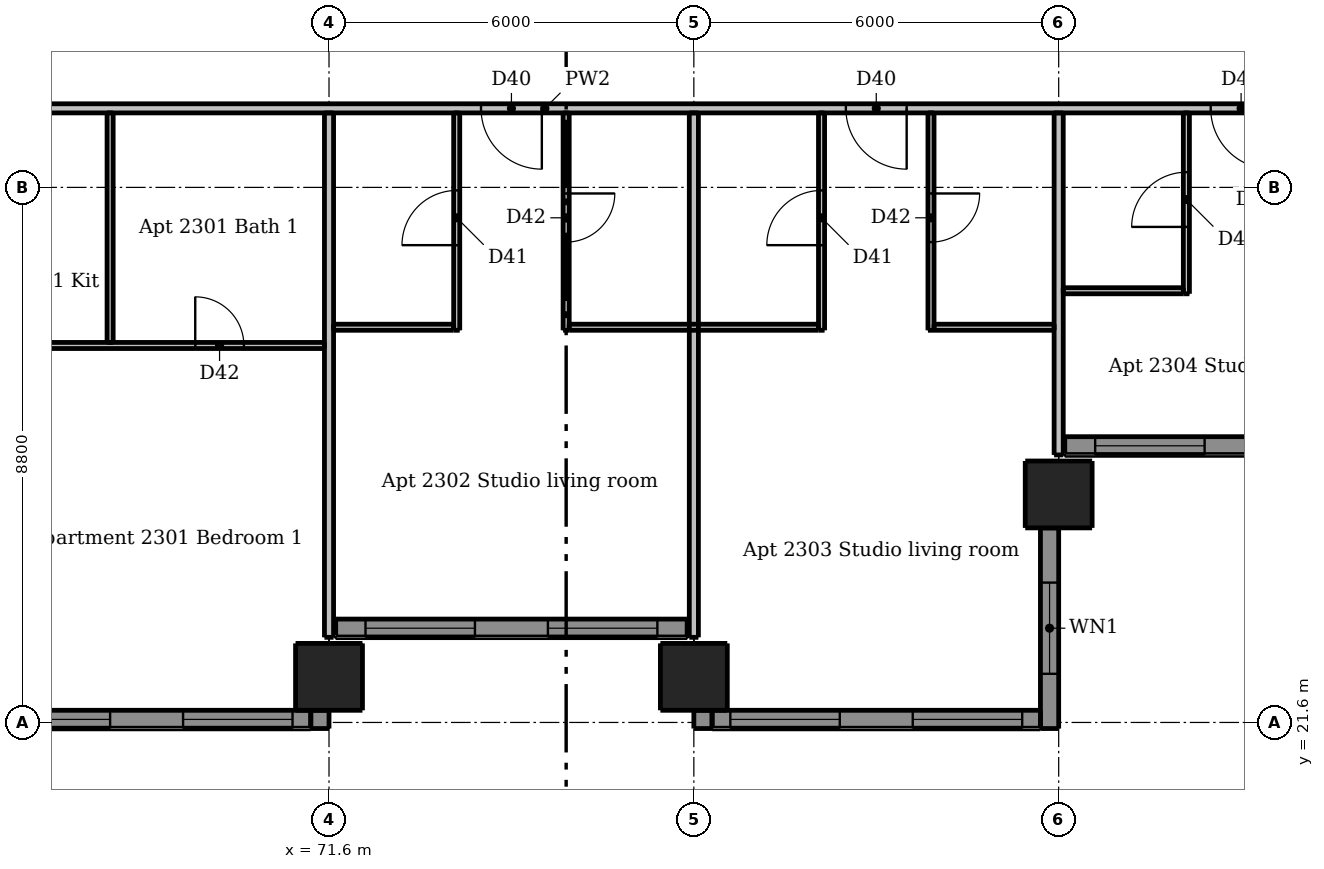
"""IFC4 building model, lengths in metres.
Left out: names, types, materials, properties, quantities, classifications, styles, units other than length and angle.
Written with IfcOpenShell. Run it as: python <this file> out.ifc"""

import sys

from ifc_helpers import new_model, si_unit, direction, frame, frame_2d, origin, origin_2d, place, context, subcontext, project, spatial, rectangle, extrude, element, fill, save


model = new_model("IFC4")
c1 = context("Model", 3, precision=1e-05, world=origin(), true_north=direction((0.0, 1.0)))
c2 = subcontext(c1, "Body", "Model", "MODEL_VIEW")
j1 = project(units=[si_unit("LENGTHUNIT", "METRE"), si_unit("PLANEANGLEUNIT", "RADIAN")], contexts=[c1])
p1 = place(None, origin())
s1 = spatial("IfcSite", under=j1, at=p1, CompositionType="ELEMENT")
p2 = place(p1, origin())
s2 = spatial("IfcBuilding", under=s1, at=p2, CompositionType="ELEMENT")
p3 = place(p2, frame((0.0, 0.0, 88.6)))
s3 = spatial("IfcBuildingStorey", under=s2, at=p3, CompositionType="ELEMENT", Elevation=88.6)
for number, where, z_axis, x_axis in (
    (1, (71.6, 22.35, 0.0), (0.0, 0.0, 1.0), (1.0, 0.0, 0.0)),
    (2, (77.6, 22.35, 0.0), (0.0, 0.0, 1.0), (1.0, 0.0, 0.0)),
    (3, (83.6, 25.35, 0.0), (0.0, 0.0, 1.0), (1.0, 0.0, 0.0)),
):
    element("IfcColumn", number, at=place(p3, frame(where, z_axis=z_axis, x_axis=x_axis)), inside=s3, PredefinedType="COLUMN", context=c2, shape_type="SweptSolid", body=[
        extrude(rectangle(XDim=1.1, YDim=1.1, at=origin_2d()), origin(), (0.0, 0.0, 1.0), 3.05),
    ])
for number, where, z_axis, x_axis in (
    (4, (71.45, 21.5, 0.0), (0.0, 0.0, 1.0), (0.0, 1.0, 0.0)),
    (5, (77.75, 21.8, 0.0), (0.0, 0.0, 1.0), (0.0, -1.0, 0.0)),
):
    element("IfcWall", number, at=place(p3, frame(where, z_axis=z_axis, x_axis=x_axis)), inside=s3, PredefinedType="SOLIDWALL", context=c2, shape_type="SweptSolid", body=[
        extrude(rectangle(XDim=0.3, YDim=0.3, at=frame_2d((0.15, 0.0))), origin(), (0.0, 0.0, 1.0), 3.05),
    ])
p4 = place(p3, frame((83.45, 21.5, 0.0), z_axis=(0.0, 0.0, 1.0), x_axis=(0.0, 1.0, 0.0)))
e6 = element("IfcWall", 6, at=p4, inside=s3, PredefinedType="SOLIDWALL", context=c2, shape_type="SweptSolid", body=[
    extrude(rectangle(XDim=3.3, YDim=0.3, at=frame_2d((1.65, 0.0))), origin(), (0.0, 0.0, 1.0), 3.05),
])
p5 = place(p4, frame((0.9, 0.0, 0.9)))
e7 = element("IfcOpeningElement", 7, at=p5, cuts=e6, PredefinedType="OPENING", context=c2, shape_type="SweptSolid", body=[
    extrude(rectangle(XDim=1.5, YDim=1.5, at=frame_2d((0.75, 0.75))), frame((0.0, 0.16, 0.0), z_axis=(0.0, -1.0, 0.0), x_axis=(1.0, 0.0, 0.0)), (0.0, 0.0, 1.0), 0.32),
])
p6 = place(p3, frame((65.6, 21.65, 0.0), z_axis=(0.0, 0.0, 1.0), x_axis=(1.0, 0.0, 0.0)))
e8 = element("IfcWall", 8, at=p6, inside=s3, PredefinedType="SOLIDWALL", context=c2, shape_type="SweptSolid", body=[
    extrude(rectangle(XDim=5.7, YDim=0.3, at=frame_2d((2.85, 0.0))), origin(), (0.0, 0.0, 1.0), 3.05),
])
p7 = place(p6, frame((0.6, 0.0, 0.15)))
e9 = element("IfcOpeningElement", 9, at=p7, cuts=e8, PredefinedType="OPENING", context=c2, shape_type="SweptSolid", body=[
    extrude(rectangle(XDim=1.8, YDim=2.1, at=frame_2d((0.9, 1.05))), frame((0.0, 0.16, 0.0), z_axis=(0.0, -1.0, 0.0), x_axis=(1.0, 0.0, 0.0)), (0.0, 0.0, 1.0), 0.32),
])
p8 = place(p6, frame((3.6, 0.0, 0.15)))
e10 = element("IfcOpeningElement", 10, at=p8, cuts=e8, PredefinedType="OPENING", context=c2, shape_type="SweptSolid", body=[
    extrude(rectangle(XDim=1.8, YDim=2.1, at=frame_2d((0.9, 1.05))), frame((0.0, 0.16, 0.0), z_axis=(0.0, -1.0, 0.0), x_axis=(1.0, 0.0, 0.0)), (0.0, 0.0, 1.0), 0.32),
])
p9 = place(p3, frame((71.71, 23.15, 0.0), z_axis=(0.0, 0.0, 1.0), x_axis=(1.0, 0.0, 0.0)))
e11 = element("IfcWall", 11, at=p9, inside=s3, PredefinedType="SOLIDWALL", context=c2, shape_type="SweptSolid", body=[
    extrude(rectangle(XDim=5.78, YDim=0.3, at=frame_2d((2.89, 0.0))), origin(), (0.0, 0.0, 1.0), 3.05),
])
p10 = place(p9, frame((0.49, 0.0, 0.15)))
e12 = element("IfcOpeningElement", 12, at=p10, cuts=e11, PredefinedType="OPENING", context=c2, shape_type="SweptSolid", body=[
    extrude(rectangle(XDim=1.8, YDim=2.1, at=frame_2d((0.9, 1.05))), frame((0.0, 0.16, 0.0), z_axis=(0.0, -1.0, 0.0), x_axis=(1.0, 0.0, 0.0)), (0.0, 0.0, 1.0), 0.32),
])
p11 = place(p9, frame((3.49, 0.0, 0.15)))
e13 = element("IfcOpeningElement", 13, at=p11, cuts=e11, PredefinedType="OPENING", context=c2, shape_type="SweptSolid", body=[
    extrude(rectangle(XDim=1.8, YDim=2.1, at=frame_2d((0.9, 1.05))), frame((0.0, 0.16, 0.0), z_axis=(0.0, -1.0, 0.0), x_axis=(1.0, 0.0, 0.0)), (0.0, 0.0, 1.0), 0.32),
])
p12 = place(p3, frame((77.9, 21.65, 0.0), z_axis=(0.0, 0.0, 1.0), x_axis=(1.0, 0.0, 0.0)))
e14 = element("IfcWall", 14, at=p12, inside=s3, PredefinedType="SOLIDWALL", context=c2, shape_type="SweptSolid", body=[
    extrude(rectangle(XDim=5.4, YDim=0.3, at=frame_2d((2.7, 0.0))), origin(), (0.0, 0.0, 1.0), 3.05),
])
p13 = place(p12, frame((0.3, 0.0, 0.15)))
e15 = element("IfcOpeningElement", 15, at=p13, cuts=e14, PredefinedType="OPENING", context=c2, shape_type="SweptSolid", body=[
    extrude(rectangle(XDim=1.8, YDim=2.1, at=frame_2d((0.9, 1.05))), frame((0.0, 0.16, 0.0), z_axis=(0.0, -1.0, 0.0), x_axis=(1.0, 0.0, 0.0)), (0.0, 0.0, 1.0), 0.32),
])
p14 = place(p12, frame((3.3, 0.0, 0.15)))
e16 = element("IfcOpeningElement", 16, at=p14, cuts=e14, PredefinedType="OPENING", context=c2, shape_type="SweptSolid", body=[
    extrude(rectangle(XDim=1.8, YDim=2.1, at=frame_2d((0.9, 1.05))), frame((0.0, 0.16, 0.0), z_axis=(0.0, -1.0, 0.0), x_axis=(1.0, 0.0, 0.0)), (0.0, 0.0, 1.0), 0.32),
])
p15 = place(p3, frame((83.7, 26.15, 0.0), z_axis=(0.0, 0.0, 1.0), x_axis=(1.0, 0.0, 0.0)))
e17 = element("IfcWall", 17, at=p15, inside=s3, PredefinedType="SOLIDWALL", context=c2, shape_type="SweptSolid", body=[
    extrude(rectangle(XDim=5.79, YDim=0.3, at=frame_2d((2.895, 0.0))), origin(), (0.0, 0.0, 1.0), 3.05),
])
p16 = place(p15, frame((0.5, 0.0, 0.15)))
e18 = element("IfcOpeningElement", 18, at=p16, cuts=e17, PredefinedType="OPENING", context=c2, shape_type="SweptSolid", body=[
    extrude(rectangle(XDim=1.8, YDim=2.1, at=frame_2d((0.9, 1.05))), frame((0.0, 0.16, 0.0), z_axis=(0.0, -1.0, 0.0), x_axis=(1.0, 0.0, 0.0)), (0.0, 0.0, 1.0), 0.32),
])
p17 = place(p15, frame((3.5, 0.0, 0.15)))
e19 = element("IfcOpeningElement", 19, at=p17, cuts=e17, PredefinedType="OPENING", context=c2, shape_type="SweptSolid", body=[
    extrude(rectangle(XDim=1.8, YDim=2.1, at=frame_2d((0.9, 1.05))), frame((0.0, 0.16, 0.0), z_axis=(0.0, -1.0, 0.0), x_axis=(1.0, 0.0, 0.0)), (0.0, 0.0, 1.0), 0.32),
])
p18 = place(p3, frame((68.0, 27.85, 0.0), z_axis=(0.0, 0.0, 1.0), x_axis=(0.0, 1.0, 0.0)))
e20 = element("IfcWall", 20, at=p18, inside=s3, PredefinedType="PARTITIONING", context=c2, shape_type="SweptSolid", body=[
    extrude(rectangle(XDim=3.775, YDim=0.1, at=frame_2d((1.887, 0.0))), origin(), (0.0, 0.0, 1.0), 3.05),
])
p19 = place(p3, frame((73.7, 28.05, 0.0), z_axis=(0.0, 0.0, 1.0), x_axis=(0.0, 1.0, 0.0)))
e21 = element("IfcWall", 21, at=p19, inside=s3, PredefinedType="PARTITIONING", context=c2, shape_type="SweptSolid", body=[
    extrude(rectangle(XDim=3.575, YDim=0.1, at=frame_2d((1.788, 0.0))), origin(), (0.0, 0.0, 1.0), 3.05),
])
p20 = place(p19, frame((1.4, 0.0, 0.0)))
e22 = element("IfcOpeningElement", 22, at=p20, cuts=e21, PredefinedType="OPENING", context=c2, shape_type="SweptSolid", body=[
    extrude(rectangle(XDim=0.9, YDim=2.1, at=frame_2d((0.45, 1.05))), frame((0.0, 0.06, 0.0), z_axis=(0.0, -1.0, 0.0), x_axis=(1.0, 0.0, 0.0)), (0.0, 0.0, 1.0), 0.12),
])
p21 = place(p3, frame((75.5, 31.625, 0.0), z_axis=(0.0, 0.0, 1.0), x_axis=(0.0, -1.0, 0.0)))
e23 = element("IfcWall", 23, at=p21, inside=s3, PredefinedType="PARTITIONING", context=c2, shape_type="SweptSolid", body=[
    extrude(rectangle(XDim=3.575, YDim=0.1, at=frame_2d((1.788, 0.0))), origin(), (0.0, 0.0, 1.0), 3.05),
])
p22 = place(p21, frame((1.325, 0.0, 0.0)))
e24 = element("IfcOpeningElement", 24, at=p22, cuts=e23, PredefinedType="OPENING", context=c2, shape_type="SweptSolid", body=[
    extrude(rectangle(XDim=0.8, YDim=2.1, at=frame_2d((0.4, 1.05))), frame((0.0, 0.06, 0.0), z_axis=(0.0, -1.0, 0.0), x_axis=(1.0, 0.0, 0.0)), (0.0, 0.0, 1.0), 0.12),
])
p23 = place(p3, frame((79.7, 28.05, 0.0), z_axis=(0.0, 0.0, 1.0), x_axis=(0.0, 1.0, 0.0)))
e25 = element("IfcWall", 25, at=p23, inside=s3, PredefinedType="PARTITIONING", context=c2, shape_type="SweptSolid", body=[
    extrude(rectangle(XDim=3.575, YDim=0.1, at=frame_2d((1.788, 0.0))), origin(), (0.0, 0.0, 1.0), 3.05),
])
p24 = place(p23, frame((1.4, 0.0, 0.0)))
e26 = element("IfcOpeningElement", 26, at=p24, cuts=e25, PredefinedType="OPENING", context=c2, shape_type="SweptSolid", body=[
    extrude(rectangle(XDim=0.9, YDim=2.1, at=frame_2d((0.45, 1.05))), frame((0.0, 0.06, 0.0), z_axis=(0.0, -1.0, 0.0), x_axis=(1.0, 0.0, 0.0)), (0.0, 0.0, 1.0), 0.12),
])
p25 = place(p3, frame((81.5, 31.625, 0.0), z_axis=(0.0, 0.0, 1.0), x_axis=(0.0, -1.0, 0.0)))
e27 = element("IfcWall", 27, at=p25, inside=s3, PredefinedType="PARTITIONING", context=c2, shape_type="SweptSolid", body=[
    extrude(rectangle(XDim=3.575, YDim=0.1, at=frame_2d((1.788, 0.0))), origin(), (0.0, 0.0, 1.0), 3.05),
])
p26 = place(p25, frame((1.325, 0.0, 0.0)))
e28 = element("IfcOpeningElement", 28, at=p26, cuts=e27, PredefinedType="OPENING", context=c2, shape_type="SweptSolid", body=[
    extrude(rectangle(XDim=0.8, YDim=2.1, at=frame_2d((0.4, 1.05))), frame((0.0, 0.06, 0.0), z_axis=(0.0, -1.0, 0.0), x_axis=(1.0, 0.0, 0.0)), (0.0, 0.0, 1.0), 0.12),
])
p27 = place(p3, frame((85.7, 28.65, 0.0), z_axis=(0.0, 0.0, 1.0), x_axis=(0.0, 1.0, 0.0)))
e29 = element("IfcWall", 29, at=p27, inside=s3, PredefinedType="PARTITIONING", context=c2, shape_type="SweptSolid", body=[
    extrude(rectangle(XDim=2.975, YDim=0.1, at=frame_2d((1.488, 0.0))), origin(), (0.0, 0.0, 1.0), 3.05),
])
p28 = place(p27, frame((1.1, 0.0, 0.0)))
e30 = element("IfcOpeningElement", 30, at=p28, cuts=e29, PredefinedType="OPENING", context=c2, shape_type="SweptSolid", body=[
    extrude(rectangle(XDim=0.9, YDim=2.1, at=frame_2d((0.45, 1.05))), frame((0.0, 0.06, 0.0), z_axis=(0.0, -1.0, 0.0), x_axis=(1.0, 0.0, 0.0)), (0.0, 0.0, 1.0), 0.12),
])
for number, where, z_axis, x_axis in (
    (31, (83.675, 28.7, 0.0), (0.0, 0.0, 1.0), (1.0, 0.0, 0.0)),
    (32, (71.675, 28.1, 0.0), (0.0, 0.0, 1.0), (1.0, 0.0, 0.0)),
):
    element("IfcWall", number, at=place(p3, frame(where, z_axis=z_axis, x_axis=x_axis)), inside=s3, PredefinedType="PARTITIONING", context=c2, shape_type="SweptSolid", body=[
        extrude(rectangle(XDim=1.975, YDim=0.1, at=frame_2d((0.987, 0.0))), origin(), (0.0, 0.0, 1.0), 3.05),
    ])
p29 = place(p3, frame((75.55, 28.1, 0.0), z_axis=(0.0, 0.0, 1.0), x_axis=(1.0, 0.0, 0.0)))
e33 = element("IfcWall", 33, at=p29, inside=s3, PredefinedType="PARTITIONING", context=c2, shape_type="SweptSolid", body=[
    extrude(rectangle(XDim=4.1, YDim=0.1, at=frame_2d((2.05, 0.0))), origin(), (0.0, 0.0, 1.0), 3.05),
])
p30 = place(p3, frame((81.55, 28.1, 0.0), z_axis=(0.0, 0.0, 1.0), x_axis=(1.0, 0.0, 0.0)))
e34 = element("IfcWall", 34, at=p30, inside=s3, PredefinedType="PARTITIONING", context=c2, shape_type="SweptSolid", body=[
    extrude(rectangle(XDim=1.975, YDim=0.1, at=frame_2d((0.987, 0.0))), origin(), (0.0, 0.0, 1.0), 3.05),
])
p31 = place(p3, frame((65.65, 27.8, 0.0), z_axis=(0.0, 0.0, 1.0), x_axis=(1.0, 0.0, 0.0)))
e35 = element("IfcWall", 35, at=p31, inside=s3, PredefinedType="PARTITIONING", context=c2, shape_type="SweptSolid", body=[
    extrude(rectangle(XDim=5.875, YDim=0.1, at=frame_2d((2.938, 0.0))), origin(), (0.0, 0.0, 1.0), 3.05),
])
p32 = place(p31, frame((3.75, 0.0, 0.0)))
e36 = element("IfcOpeningElement", 36, at=p32, cuts=e35, PredefinedType="OPENING", context=c2, shape_type="SweptSolid", body=[
    extrude(rectangle(XDim=0.8, YDim=2.1, at=frame_2d((0.4, 1.05))), frame((0.0, 0.06, 0.0), z_axis=(0.0, -1.0, 0.0), x_axis=(1.0, 0.0, 0.0)), (0.0, 0.0, 1.0), 0.12),
])
for number, where, z_axis, x_axis in (
    (37, (71.6, 23.0, 0.0), (0.0, 0.0, 1.0), (0.0, 1.0, 0.0)),
    (38, (77.6, 23.0, 0.0), (0.0, 0.0, 1.0), (0.0, 1.0, 0.0)),
):
    element("IfcWall", number, at=place(p3, frame(where, z_axis=z_axis, x_axis=x_axis)), inside=s3, PredefinedType="PARTITIONING", context=c2, shape_type="SweptSolid", body=[
        extrude(rectangle(XDim=8.625, YDim=0.15, at=frame_2d((4.312, 0.0))), origin(), (0.0, 0.0, 1.0), 2.516),
    ])
p33 = place(p3, frame((83.6, 26.0, 0.0), z_axis=(0.0, 0.0, 1.0), x_axis=(0.0, 1.0, 0.0)))
e39 = element("IfcWall", 39, at=p33, inside=s3, PredefinedType="PARTITIONING", context=c2, shape_type="SweptSolid", body=[
    extrude(rectangle(XDim=5.625, YDim=0.15, at=frame_2d((2.812, 0.0))), origin(), (0.0, 0.0, 1.0), 2.59),
])
p34 = place(p3, frame((89.525, 31.7, 0.0), z_axis=(0.0, 0.0, 1.0), x_axis=(-1.0, 0.0, 0.0)))
e40 = element("IfcWall", 40, at=p34, inside=s3, PredefinedType="PARTITIONING", context=c2, shape_type="SweptSolid", body=[
    extrude(rectangle(XDim=28.75, YDim=0.15, at=frame_2d((14.375, 0.0))), origin(), (0.0, 0.0, 1.0), 3.05),
])
p35 = place(p34, frame((25.875, 0.0, 0.0)))
e41 = element("IfcOpeningElement", 41, at=p35, cuts=e40, PredefinedType="OPENING", context=c2, shape_type="SweptSolid", body=[
    extrude(rectangle(XDim=1.0, YDim=2.1, at=frame_2d((0.5, 1.05))), frame((0.0, 0.085, 0.0), z_axis=(0.0, -1.0, 0.0), x_axis=(1.0, 0.0, 0.0)), (0.0, 0.0, 1.0), 0.17),
])
p36 = place(p34, frame((14.425, 0.0, 0.0)))
e42 = element("IfcOpeningElement", 42, at=p36, cuts=e40, PredefinedType="OPENING", context=c2, shape_type="SweptSolid", body=[
    extrude(rectangle(XDim=1.0, YDim=2.1, at=frame_2d((0.5, 1.05))), frame((0.0, 0.085, 0.0), z_axis=(0.0, -1.0, 0.0), x_axis=(1.0, 0.0, 0.0)), (0.0, 0.0, 1.0), 0.17),
])
p37 = place(p34, frame((8.425, 0.0, 0.0)))
e43 = element("IfcOpeningElement", 43, at=p37, cuts=e40, PredefinedType="OPENING", context=c2, shape_type="SweptSolid", body=[
    extrude(rectangle(XDim=1.0, YDim=2.1, at=frame_2d((0.5, 1.05))), frame((0.0, 0.085, 0.0), z_axis=(0.0, -1.0, 0.0), x_axis=(1.0, 0.0, 0.0)), (0.0, 0.0, 1.0), 0.17),
])
p38 = place(p34, frame((2.425, 0.0, 0.0)))
e44 = element("IfcOpeningElement", 44, at=p38, cuts=e40, PredefinedType="OPENING", context=c2, shape_type="SweptSolid", body=[
    extrude(rectangle(XDim=1.0, YDim=2.1, at=frame_2d((0.5, 1.05))), frame((0.0, 0.085, 0.0), z_axis=(0.0, -1.0, 0.0), x_axis=(1.0, 0.0, 0.0)), (0.0, 0.0, 1.0), 0.17),
])
p39 = place(p5, origin())
e45 = element("IfcWindow", 45, at=p39, inside=s3, PartitioningType="DOUBLE_PANEL_VERTICAL", PredefinedType="WINDOW", context=c2, shape_type="SweptSolid", body=[
    extrude(rectangle(XDim=1.5, YDim=1.5, at=frame_2d((0.75, 0.75))), frame((0.0, 0.03, 0.0), z_axis=(0.0, -1.0, 0.0), x_axis=(1.0, 0.0, 0.0)), (0.0, 0.0, 1.0), 0.06),
])
fill(e7, e45)
p40 = place(p7, origin())
e46 = element("IfcWindow", 46, at=p40, inside=s3, PartitioningType="DOUBLE_PANEL_VERTICAL", PredefinedType="WINDOW", context=c2, shape_type="SweptSolid", body=[
    extrude(rectangle(XDim=1.8, YDim=2.1, at=frame_2d((0.9, 1.05))), frame((0.0, 0.03, 0.0), z_axis=(0.0, -1.0, 0.0), x_axis=(1.0, 0.0, 0.0)), (0.0, 0.0, 1.0), 0.06),
])
fill(e9, e46)
p41 = place(p8, origin())
e47 = element("IfcWindow", 47, at=p41, inside=s3, PartitioningType="DOUBLE_PANEL_VERTICAL", PredefinedType="WINDOW", context=c2, shape_type="SweptSolid", body=[
    extrude(rectangle(XDim=1.8, YDim=2.1, at=frame_2d((0.9, 1.05))), frame((0.0, 0.03, 0.0), z_axis=(0.0, -1.0, 0.0), x_axis=(1.0, 0.0, 0.0)), (0.0, 0.0, 1.0), 0.06),
])
fill(e10, e47)
p42 = place(p10, origin())
e48 = element("IfcWindow", 48, at=p42, inside=s3, PartitioningType="DOUBLE_PANEL_VERTICAL", PredefinedType="WINDOW", context=c2, shape_type="SweptSolid", body=[
    extrude(rectangle(XDim=1.8, YDim=2.1, at=frame_2d((0.9, 1.05))), frame((0.0, 0.03, 0.0), z_axis=(0.0, -1.0, 0.0), x_axis=(1.0, 0.0, 0.0)), (0.0, 0.0, 1.0), 0.06),
])
fill(e12, e48)
p43 = place(p11, origin())
e49 = element("IfcWindow", 49, at=p43, inside=s3, PartitioningType="DOUBLE_PANEL_VERTICAL", PredefinedType="WINDOW", context=c2, shape_type="SweptSolid", body=[
    extrude(rectangle(XDim=1.8, YDim=2.1, at=frame_2d((0.9, 1.05))), frame((0.0, 0.03, 0.0), z_axis=(0.0, -1.0, 0.0), x_axis=(1.0, 0.0, 0.0)), (0.0, 0.0, 1.0), 0.06),
])
fill(e13, e49)
p44 = place(p13, origin())
e50 = element("IfcWindow", 50, at=p44, inside=s3, PartitioningType="DOUBLE_PANEL_VERTICAL", PredefinedType="WINDOW", context=c2, shape_type="SweptSolid", body=[
    extrude(rectangle(XDim=1.8, YDim=2.1, at=frame_2d((0.9, 1.05))), frame((0.0, 0.03, 0.0), z_axis=(0.0, -1.0, 0.0), x_axis=(1.0, 0.0, 0.0)), (0.0, 0.0, 1.0), 0.06),
])
fill(e15, e50)
p45 = place(p14, origin())
e51 = element("IfcWindow", 51, at=p45, inside=s3, PartitioningType="DOUBLE_PANEL_VERTICAL", PredefinedType="WINDOW", context=c2, shape_type="SweptSolid", body=[
    extrude(rectangle(XDim=1.8, YDim=2.1, at=frame_2d((0.9, 1.05))), frame((0.0, 0.03, 0.0), z_axis=(0.0, -1.0, 0.0), x_axis=(1.0, 0.0, 0.0)), (0.0, 0.0, 1.0), 0.06),
])
fill(e16, e51)
p46 = place(p16, origin())
e52 = element("IfcWindow", 52, at=p46, inside=s3, PartitioningType="DOUBLE_PANEL_VERTICAL", PredefinedType="WINDOW", context=c2, shape_type="SweptSolid", body=[
    extrude(rectangle(XDim=1.8, YDim=2.1, at=frame_2d((0.9, 1.05))), frame((0.0, 0.03, 0.0), z_axis=(0.0, -1.0, 0.0), x_axis=(1.0, 0.0, 0.0)), (0.0, 0.0, 1.0), 0.06),
])
fill(e18, e52)
p47 = place(p32, origin())
e53 = element("IfcDoor", 53, at=p47, inside=s3, OperationType="SINGLE_SWING_LEFT", PredefinedType="DOOR", context=c2, shape_type="SweptSolid", body=[
    extrude(rectangle(XDim=0.8, YDim=2.1, at=frame_2d((0.4, 1.05))), frame((0.0, 0.025, 0.0), z_axis=(0.0, -1.0, 0.0), x_axis=(1.0, 0.0, 0.0)), (0.0, 0.0, 1.0), 0.05),
])
fill(e36, e53)
p48 = place(p36, origin())
e54 = element("IfcDoor", 54, at=p48, inside=s3, OperationType="SINGLE_SWING_LEFT", PredefinedType="DOOR", context=c2, shape_type="SweptSolid", body=[
    extrude(rectangle(XDim=1.0, YDim=2.1, at=frame_2d((0.5, 1.05))), frame((0.0, 0.025, 0.0), z_axis=(0.0, -1.0, 0.0), x_axis=(1.0, 0.0, 0.0)), (0.0, 0.0, 1.0), 0.05),
])
fill(e42, e54)
p49 = place(p20, origin())
e55 = element("IfcDoor", 55, at=p49, inside=s3, OperationType="SINGLE_SWING_LEFT", PredefinedType="DOOR", context=c2, shape_type="SweptSolid", body=[
    extrude(rectangle(XDim=0.9, YDim=2.1, at=frame_2d((0.45, 1.05))), frame((0.0, 0.025, 0.0), z_axis=(0.0, -1.0, 0.0), x_axis=(1.0, 0.0, 0.0)), (0.0, 0.0, 1.0), 0.05),
])
fill(e22, e55)
p50 = place(p22, origin())
e56 = element("IfcDoor", 56, at=p50, inside=s3, OperationType="SINGLE_SWING_LEFT", PredefinedType="DOOR", context=c2, shape_type="SweptSolid", body=[
    extrude(rectangle(XDim=0.8, YDim=2.1, at=frame_2d((0.4, 1.05))), frame((0.0, 0.025, 0.0), z_axis=(0.0, -1.0, 0.0), x_axis=(1.0, 0.0, 0.0)), (0.0, 0.0, 1.0), 0.05),
])
fill(e24, e56)
p51 = place(p37, origin())
e57 = element("IfcDoor", 57, at=p51, inside=s3, OperationType="SINGLE_SWING_LEFT", PredefinedType="DOOR", context=c2, shape_type="SweptSolid", body=[
    extrude(rectangle(XDim=1.0, YDim=2.1, at=frame_2d((0.5, 1.05))), frame((0.0, 0.025, 0.0), z_axis=(0.0, -1.0, 0.0), x_axis=(1.0, 0.0, 0.0)), (0.0, 0.0, 1.0), 0.05),
])
fill(e43, e57)
p52 = place(p24, origin())
e58 = element("IfcDoor", 58, at=p52, inside=s3, OperationType="SINGLE_SWING_LEFT", PredefinedType="DOOR", context=c2, shape_type="SweptSolid", body=[
    extrude(rectangle(XDim=0.9, YDim=2.1, at=frame_2d((0.45, 1.05))), frame((0.0, 0.025, 0.0), z_axis=(0.0, -1.0, 0.0), x_axis=(1.0, 0.0, 0.0)), (0.0, 0.0, 1.0), 0.05),
])
fill(e26, e58)
p53 = place(p26, origin())
e59 = element("IfcDoor", 59, at=p53, inside=s3, OperationType="SINGLE_SWING_LEFT", PredefinedType="DOOR", context=c2, shape_type="SweptSolid", body=[
    extrude(rectangle(XDim=0.8, YDim=2.1, at=frame_2d((0.4, 1.05))), frame((0.0, 0.025, 0.0), z_axis=(0.0, -1.0, 0.0), x_axis=(1.0, 0.0, 0.0)), (0.0, 0.0, 1.0), 0.05),
])
fill(e28, e59)
p54 = place(p38, origin())
e60 = element("IfcDoor", 60, at=p54, inside=s3, OperationType="SINGLE_SWING_LEFT", PredefinedType="DOOR", context=c2, shape_type="SweptSolid", body=[
    extrude(rectangle(XDim=1.0, YDim=2.1, at=frame_2d((0.5, 1.05))), frame((0.0, 0.025, 0.0), z_axis=(0.0, -1.0, 0.0), x_axis=(1.0, 0.0, 0.0)), (0.0, 0.0, 1.0), 0.05),
])
fill(e44, e60)
p55 = place(p28, origin())
e61 = element("IfcDoor", 61, at=p55, inside=s3, OperationType="SINGLE_SWING_LEFT", PredefinedType="DOOR", context=c2, shape_type="SweptSolid", body=[
    extrude(rectangle(XDim=0.9, YDim=2.1, at=frame_2d((0.45, 1.05))), frame((0.0, 0.025, 0.0), z_axis=(0.0, -1.0, 0.0), x_axis=(1.0, 0.0, 0.0)), (0.0, 0.0, 1.0), 0.05),
])
fill(e30, e61)
save(model, sys.argv[1])
